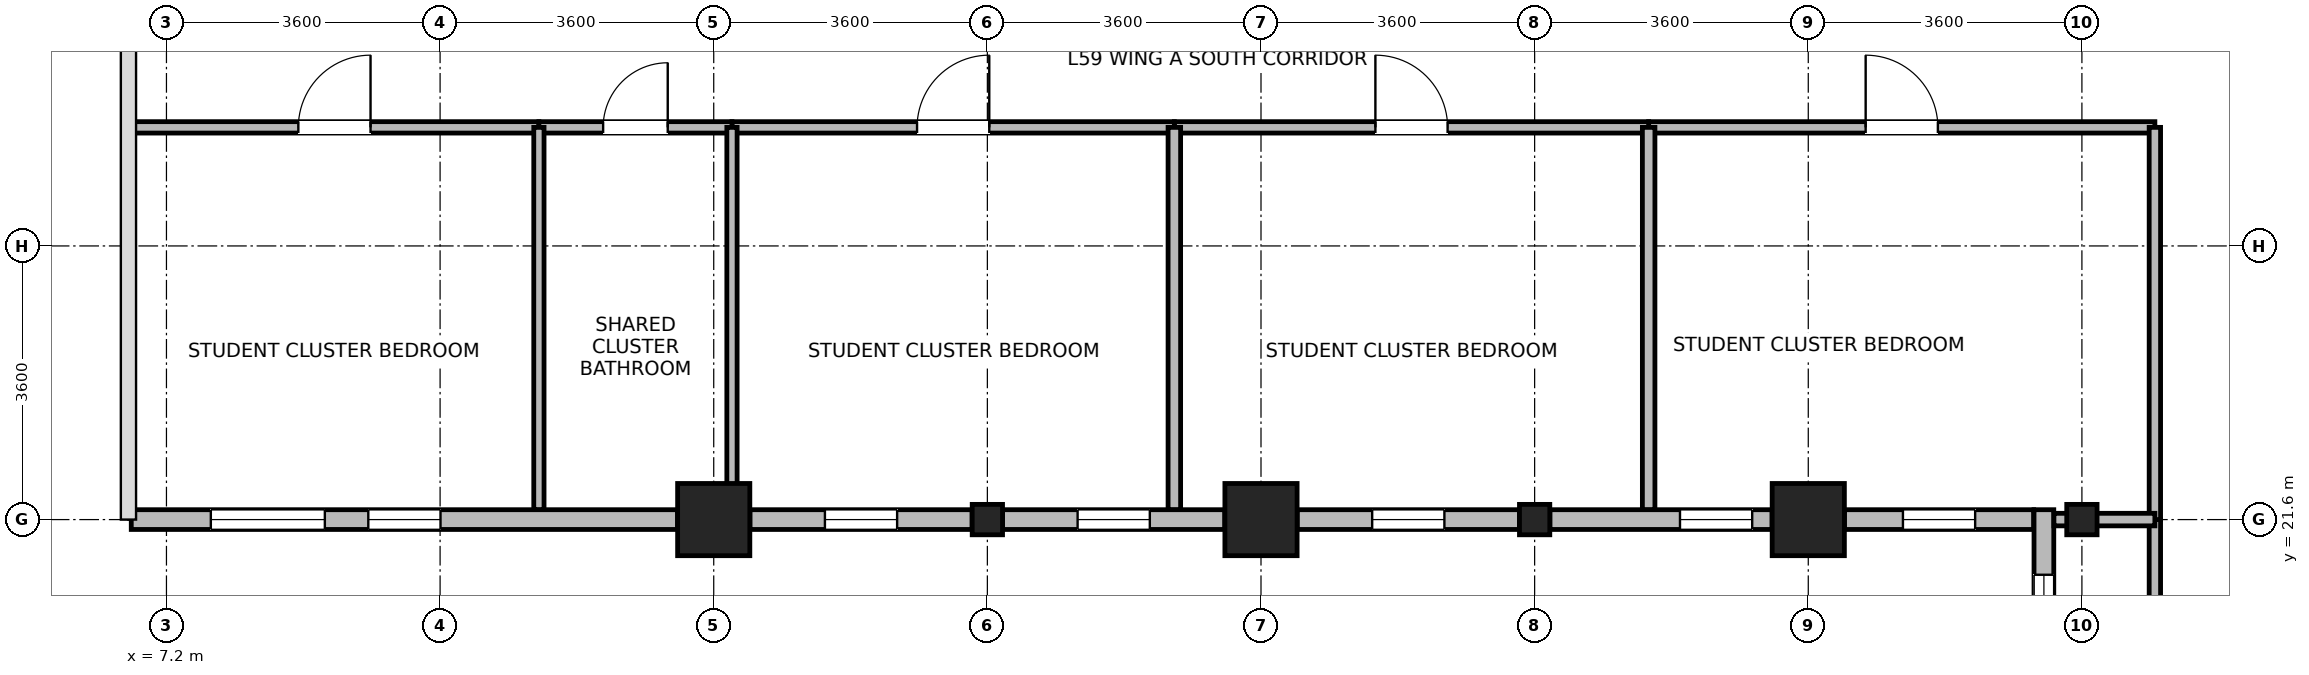
"""IFC4 building model, lengths in metres.
Left out: names, types, materials, properties, quantities, classifications, styles, units other than length and angle.
Written with IfcOpenShell. Run it as: python <this file> out.ifc"""

import sys

from ifc_helpers import new_model, si_unit, direction, frame, frame_2d, origin, origin_2d, place, context, subcontext, project, spatial, rectangle, i_section, extrude, source, transform, mapped, element, fill, save


model = new_model("IFC4")
c1 = context("Model", 3, precision=1e-05, world=origin(), true_north=direction((0.0, 1.0)))
c2 = subcontext(c1, "Body", "Model", "MODEL_VIEW")
j1 = project(units=[si_unit("LENGTHUNIT", "METRE"), si_unit("PLANEANGLEUNIT", "RADIAN")], contexts=[c1])
p1 = place(None, origin())
s1 = spatial("IfcSite", under=j1, at=p1, CompositionType="ELEMENT")
p2 = place(p1, origin())
s2 = spatial("IfcBuilding", under=s1, at=p2, CompositionType="ELEMENT")
p3 = place(p2, frame((0.0, 0.0, 231.4)))
s3 = spatial("IfcBuildingStorey", under=s2, at=p3, CompositionType="ELEMENT", Elevation=231.4)
m1 = source(origin(), c2, "Body", "SweptSolid", [
    extrude(rectangle(XDim=0.95, YDim=0.95, at=origin_2d()), origin(), (0.0, 0.0, 1.0), 3.7),
])
for number, where, z_axis, x_axis in (
    (1, (14.4, 21.6, 0.0), (0.0, 0.0, 1.0), (1.0, 0.0, 0.0)),
    (2, (21.6, 21.6, 0.0), (0.0, 0.0, 1.0), (1.0, 0.0, 0.0)),
    (3, (28.8, 21.6, 0.0), (0.0, 0.0, 1.0), (1.0, 0.0, 0.0)),
):
    element("IfcColumn", number, at=place(p3, frame(where, z_axis=z_axis, x_axis=x_axis)), inside=s3, PredefinedType="COLUMN", context=c2, shape_type="MappedRepresentation", body=[
        mapped(m1, transform((0.0, 0.0, 0.0), x_axis=(1.0, 0.0, 0.0), y_axis=(0.0, 1.0, 0.0), z_axis=(0.0, 0.0, 1.0), scale=1.0)),
    ])
m2 = source(origin(), c2, "Body", "SweptSolid", [
    extrude(i_section(OverallWidth=0.399, OverallDepth=0.4, WebThickness=0.017, FlangeThickness=0.023, FilletRadius=0.015, at=origin_2d()), origin(), (0.0, 0.0, 1.0), 3.7),
])
for number, where, z_axis, x_axis in (
    (4, (18.0, 21.6, 0.0), (0.0, 0.0, 1.0), (1.0, 0.0, 0.0)),
    (5, (25.2, 21.6, 0.0), (0.0, 0.0, 1.0), (1.0, 0.0, 0.0)),
    (6, (32.4, 21.6, 0.0), (0.0, 0.0, 1.0), (1.0, 0.0, 0.0)),
):
    element("IfcColumn", number, at=place(p3, frame(where, z_axis=z_axis, x_axis=x_axis)), inside=s3, PredefinedType="COLUMN", context=c2, shape_type="MappedRepresentation", body=[
        mapped(m2, transform((0.0, 0.0, 0.0), x_axis=(1.0, 0.0, 0.0), y_axis=(0.0, 1.0, 0.0), z_axis=(0.0, 0.0, 1.0), scale=1.0)),
    ])
p4 = place(p3, frame((13.924, 21.6, 0.0), z_axis=(0.0, 0.0, 1.0), x_axis=(-1.0, 0.0, 0.0)))
e7 = element("IfcWall", 7, at=p4, inside=s3, PredefinedType="STANDARD", context=c2, shape_type="SweptSolid", body=[
    extrude(rectangle(XDim=7.187, YDim=0.26, at=frame_2d((3.594, 0.0))), origin(), (0.0, 0.0, 1.0), 3.42),
])
p5 = place(p4, frame((4.64, 0.0, 0.85)))
e8 = element("IfcOpeningElement", 8, at=p5, cuts=e7, PredefinedType="OPENING", context=c2, shape_type="SweptSolid", body=[
    extrude(rectangle(XDim=1.5, YDim=1.85, at=frame_2d((0.75, 0.925))), frame((0.0, 0.14, 0.0), z_axis=(0.0, -1.0, 0.0), x_axis=(1.0, 0.0, 0.0)), (0.0, 0.0, 1.0), 0.28),
])
p6 = place(p4, frame((3.118, 0.0, 0.85)))
e9 = element("IfcOpeningElement", 9, at=p6, cuts=e7, PredefinedType="OPENING", context=c2, shape_type="SweptSolid", body=[
    extrude(rectangle(XDim=0.95, YDim=1.75, at=frame_2d((0.475, 0.875))), frame((0.0, 0.14, 0.0), z_axis=(0.0, -1.0, 0.0), x_axis=(1.0, 0.0, 0.0)), (0.0, 0.0, 1.0), 0.28),
])
p7 = place(p3, frame((17.8, 21.6, 0.0), z_axis=(0.0, 0.0, 1.0), x_axis=(-1.0, 0.0, 0.0)))
e10 = element("IfcWall", 10, at=p7, inside=s3, PredefinedType="STANDARD", context=c2, shape_type="SweptSolid", body=[
    extrude(rectangle(XDim=2.924, YDim=0.26, at=frame_2d((1.462, 0.0))), origin(), (0.0, 0.0, 1.0), 3.02),
])
p8 = place(p7, frame((0.987, 0.0, 0.85)))
e11 = element("IfcOpeningElement", 11, at=p8, cuts=e10, PredefinedType="OPENING", context=c2, shape_type="SweptSolid", body=[
    extrude(rectangle(XDim=0.95, YDim=1.75, at=frame_2d((0.475, 0.875))), frame((0.0, 0.14, 0.0), z_axis=(0.0, -1.0, 0.0), x_axis=(1.0, 0.0, 0.0)), (0.0, 0.0, 1.0), 0.28),
])
p9 = place(p3, frame((21.124, 21.6, 0.0), z_axis=(0.0, 0.0, 1.0), x_axis=(-1.0, 0.0, 0.0)))
e12 = element("IfcWall", 12, at=p9, inside=s3, PredefinedType="STANDARD", context=c2, shape_type="SweptSolid", body=[
    extrude(rectangle(XDim=2.924, YDim=0.26, at=frame_2d((1.462, 0.0))), origin(), (0.0, 0.0, 1.0), 3.02),
])
p10 = place(p9, frame((0.987, 0.0, 0.85)))
e13 = element("IfcOpeningElement", 13, at=p10, cuts=e12, PredefinedType="OPENING", context=c2, shape_type="SweptSolid", body=[
    extrude(rectangle(XDim=0.95, YDim=1.75, at=frame_2d((0.475, 0.875))), frame((0.0, 0.14, 0.0), z_axis=(0.0, -1.0, 0.0), x_axis=(1.0, 0.0, 0.0)), (0.0, 0.0, 1.0), 0.28),
])
p11 = place(p3, frame((25.0, 21.6, 0.0), z_axis=(0.0, 0.0, 1.0), x_axis=(-1.0, 0.0, 0.0)))
e14 = element("IfcWall", 14, at=p11, inside=s3, PredefinedType="STANDARD", context=c2, shape_type="SweptSolid", body=[
    extrude(rectangle(XDim=2.924, YDim=0.26, at=frame_2d((1.462, 0.0))), origin(), (0.0, 0.0, 1.0), 3.02),
])
p12 = place(p11, frame((0.987, 0.0, 0.85)))
e15 = element("IfcOpeningElement", 15, at=p12, cuts=e14, PredefinedType="OPENING", context=c2, shape_type="SweptSolid", body=[
    extrude(rectangle(XDim=0.95, YDim=1.75, at=frame_2d((0.475, 0.875))), frame((0.0, 0.14, 0.0), z_axis=(0.0, -1.0, 0.0), x_axis=(1.0, 0.0, 0.0)), (0.0, 0.0, 1.0), 0.28),
])
p13 = place(p3, frame((28.324, 21.6, 0.0), z_axis=(0.0, 0.0, 1.0), x_axis=(-1.0, 0.0, 0.0)))
e16 = element("IfcWall", 16, at=p13, inside=s3, PredefinedType="STANDARD", context=c2, shape_type="SweptSolid", body=[
    extrude(rectangle(XDim=2.924, YDim=0.26, at=frame_2d((1.462, 0.0))), origin(), (0.0, 0.0, 1.0), 3.02),
])
p14 = place(p13, frame((0.262, 0.0, 0.85)))
e17 = element("IfcOpeningElement", 17, at=p14, cuts=e16, PredefinedType="OPENING", context=c2, shape_type="SweptSolid", body=[
    extrude(rectangle(XDim=0.95, YDim=1.75, at=frame_2d((0.475, 0.875))), frame((0.0, 0.14, 0.0), z_axis=(0.0, -1.0, 0.0), x_axis=(1.0, 0.0, 0.0)), (0.0, 0.0, 1.0), 0.28),
])
p15 = place(p3, frame((31.765, 21.6, 0.0), z_axis=(0.0, 0.0, 1.0), x_axis=(-1.0, 0.0, 0.0)))
e18 = element("IfcWall", 18, at=p15, inside=s3, PredefinedType="STANDARD", context=c2, shape_type="SweptSolid", body=[
    extrude(rectangle(XDim=2.489, YDim=0.26, at=frame_2d((1.245, 0.0))), origin(), (0.0, 0.0, 1.0), 3.02),
])
p16 = place(p15, frame((0.77, 0.0, 0.85)))
e19 = element("IfcOpeningElement", 19, at=p16, cuts=e18, PredefinedType="OPENING", context=c2, shape_type="SweptSolid", body=[
    extrude(rectangle(XDim=0.95, YDim=1.75, at=frame_2d((0.475, 0.875))), frame((0.0, 0.14, 0.0), z_axis=(0.0, -1.0, 0.0), x_axis=(1.0, 0.0, 0.0)), (0.0, 0.0, 1.0), 0.28),
])
p17 = place(p3, frame((31.9, 5.67, 0.0), z_axis=(0.0, 0.0, 1.0), x_axis=(0.0, 1.0, 0.0)))
e20 = element("IfcWall", 20, at=p17, inside=s3, PredefinedType="STANDARD", context=c2, shape_type="SweptSolid", body=[
    extrude(rectangle(XDim=16.06, YDim=0.26, at=frame_2d((8.03, 0.0))), origin(), (0.0, 0.0, 1.0), 3.42),
])
p18 = place(p17, frame((4.068, 0.0, 0.85)))
e21 = element("IfcOpeningElement", 21, at=p18, cuts=e20, PredefinedType="OPENING", context=c2, shape_type="SweptSolid", body=[
    extrude(rectangle(XDim=1.5, YDim=1.85, at=frame_2d((0.75, 0.925))), frame((0.0, 0.14, 0.0), z_axis=(0.0, -1.0, 0.0), x_axis=(1.0, 0.0, 0.0)), (0.0, 0.0, 1.0), 0.28),
])
p19 = place(p17, frame((10.492, 0.0, 0.85)))
e22 = element("IfcOpeningElement", 22, at=p19, cuts=e20, PredefinedType="OPENING", context=c2, shape_type="SweptSolid", body=[
    extrude(rectangle(XDim=1.5, YDim=1.85, at=frame_2d((0.75, 0.925))), frame((0.0, 0.14, 0.0), z_axis=(0.0, -1.0, 0.0), x_axis=(1.0, 0.0, 0.0)), (0.0, 0.0, 1.0), 0.28),
])
p20 = place(p17, frame((13.704, 0.0, 0.85)))
e23 = element("IfcOpeningElement", 23, at=p20, cuts=e20, PredefinedType="OPENING", context=c2, shape_type="SweptSolid", body=[
    extrude(rectangle(XDim=1.5, YDim=1.85, at=frame_2d((0.75, 0.925))), frame((0.0, 0.14, 0.0), z_axis=(0.0, -1.0, 0.0), x_axis=(1.0, 0.0, 0.0)), (0.0, 0.0, 1.0), 0.28),
])
p21 = place(p3, frame((33.36, 14.5, 0.0), z_axis=(0.0, 0.0, 1.0), x_axis=(0.0, 1.0, 0.0)))
e24 = element("IfcWall", 24, at=p21, inside=s3, PredefinedType="PARTITIONING", context=c2, shape_type="SweptSolid", body=[
    extrude(rectangle(XDim=7.1, YDim=0.15, at=frame_2d((3.55, 0.0))), origin(), (0.0, 0.0, 1.0), 3.42),
])
p22 = place(p21, frame((2.9, 0.0, 0.0)))
e25 = element("IfcOpeningElement", 25, at=p22, cuts=e24, PredefinedType="OPENING", context=c2, shape_type="SweptSolid", body=[
    extrude(rectangle(XDim=1.3, YDim=2.12, at=frame_2d((0.65, 1.06))), frame((0.0, 0.085, 0.0), z_axis=(0.0, -1.0, 0.0), x_axis=(1.0, 0.0, 0.0)), (0.0, 0.0, 1.0), 0.17),
])
p23 = place(p3, frame((26.7, 26.76, 0.0), z_axis=(0.0, 0.0, 1.0), x_axis=(1.0, 0.0, 0.0)))
e26 = element("IfcWall", 26, at=p23, inside=s3, PredefinedType="PARTITIONING", context=c2, shape_type="SweptSolid", body=[
    extrude(rectangle(XDim=6.66, YDim=0.15, at=frame_2d((3.33, 0.0))), origin(), (0.0, 0.0, 1.0), 3.42),
])
p24 = place(p23, frame((2.855, 0.0, 0.0)))
e27 = element("IfcOpeningElement", 27, at=p24, cuts=e26, PredefinedType="OPENING", context=c2, shape_type="SweptSolid", body=[
    extrude(rectangle(XDim=0.95, YDim=2.1, at=frame_2d((0.475, 1.05))), frame((0.0, 0.085, 0.0), z_axis=(0.0, -1.0, 0.0), x_axis=(1.0, 0.0, 0.0)), (0.0, 0.0, 1.0), 0.17),
])
p25 = place(p3, frame((20.46, 26.76, 0.0), z_axis=(0.0, 0.0, 1.0), x_axis=(1.0, 0.0, 0.0)))
e28 = element("IfcWall", 28, at=p25, inside=s3, PredefinedType="PARTITIONING", context=c2, shape_type="SweptSolid", body=[
    extrude(rectangle(XDim=6.24, YDim=0.15, at=frame_2d((3.12, 0.0))), origin(), (0.0, 0.0, 1.0), 3.42),
])
p26 = place(p25, frame((2.645, 0.0, 0.0)))
e29 = element("IfcOpeningElement", 29, at=p26, cuts=e28, PredefinedType="OPENING", context=c2, shape_type="SweptSolid", body=[
    extrude(rectangle(XDim=0.95, YDim=2.1, at=frame_2d((0.475, 1.05))), frame((0.0, 0.085, 0.0), z_axis=(0.0, -1.0, 0.0), x_axis=(1.0, 0.0, 0.0)), (0.0, 0.0, 1.0), 0.17),
])
p27 = place(p3, frame((14.64, 26.76, 0.0), z_axis=(0.0, 0.0, 1.0), x_axis=(1.0, 0.0, 0.0)))
e30 = element("IfcWall", 30, at=p27, inside=s3, PredefinedType="PARTITIONING", context=c2, shape_type="SweptSolid", body=[
    extrude(rectangle(XDim=5.82, YDim=0.15, at=frame_2d((2.91, 0.0))), origin(), (0.0, 0.0, 1.0), 3.42),
])
p28 = place(p27, frame((2.435, 0.0, 0.0)))
e31 = element("IfcOpeningElement", 31, at=p28, cuts=e30, PredefinedType="OPENING", context=c2, shape_type="SweptSolid", body=[
    extrude(rectangle(XDim=0.95, YDim=2.1, at=frame_2d((0.475, 1.05))), frame((0.0, 0.085, 0.0), z_axis=(0.0, -1.0, 0.0), x_axis=(1.0, 0.0, 0.0)), (0.0, 0.0, 1.0), 0.17),
])
p29 = place(p3, frame((6.72, 26.76, 0.0), z_axis=(0.0, 0.0, 1.0), x_axis=(1.0, 0.0, 0.0)))
e32 = element("IfcWall", 32, at=p29, inside=s3, PredefinedType="PARTITIONING", context=c2, shape_type="SweptSolid", body=[
    extrude(rectangle(XDim=5.38, YDim=0.15, at=frame_2d((2.69, 0.0))), origin(), (0.0, 0.0, 1.0), 3.42),
])
p30 = place(p29, frame((2.215, 0.0, 0.0)))
e33 = element("IfcOpeningElement", 33, at=p30, cuts=e32, PredefinedType="OPENING", context=c2, shape_type="SweptSolid", body=[
    extrude(rectangle(XDim=0.95, YDim=2.1, at=frame_2d((0.475, 1.05))), frame((0.0, 0.085, 0.0), z_axis=(0.0, -1.0, 0.0), x_axis=(1.0, 0.0, 0.0)), (0.0, 0.0, 1.0), 0.17),
])
p31 = place(p3, frame((33.36, 21.6, 0.0), z_axis=(0.0, 0.0, 1.0), x_axis=(0.0, 1.0, 0.0)))
e34 = element("IfcWall", 34, at=p31, inside=s3, PredefinedType="PARTITIONING", context=c2, shape_type="SweptSolid", body=[
    extrude(rectangle(XDim=5.16, YDim=0.15, at=frame_2d((2.58, 0.0))), origin(), (0.0, 0.0, 1.0), 3.42),
])
p32 = place(p3, frame((12.1, 26.76, 0.0), z_axis=(0.0, 0.0, 1.0), x_axis=(1.0, 0.0, 0.0)))
e35 = element("IfcWall", 35, at=p32, inside=s3, PredefinedType="PARTITIONING", context=c2, shape_type="SweptSolid", body=[
    extrude(rectangle(XDim=2.54, YDim=0.15, at=frame_2d((1.27, 0.0))), origin(), (0.0, 0.0, 1.0), 3.42),
])
p33 = place(p32, frame((0.845, 0.0, 0.0)))
e36 = element("IfcOpeningElement", 36, at=p33, cuts=e35, PredefinedType="OPENING", context=c2, shape_type="SweptSolid", body=[
    extrude(rectangle(XDim=0.85, YDim=2.04, at=frame_2d((0.425, 1.02))), frame((0.0, 0.085, 0.0), z_axis=(0.0, -1.0, 0.0), x_axis=(1.0, 0.0, 0.0)), (0.0, 0.0, 1.0), 0.17),
])
for number, where, z_axis, x_axis in (
    (37, (12.1, 21.732, 0.0), (0.0, 0.0, 1.0), (0.0, 1.0, 0.0)),
    (38, (14.64, 21.732, 0.0), (0.0, 0.0, 1.0), (0.0, 1.0, 0.0)),
):
    element("IfcWall", number, at=place(p3, frame(where, z_axis=z_axis, x_axis=x_axis)), inside=s3, PredefinedType="PARTITIONING", context=c2, shape_type="SweptSolid", body=[
        extrude(rectangle(XDim=5.028, YDim=0.135, at=frame_2d((2.514, 0.0))), origin(), (0.0, 0.0, 1.0), 3.42),
    ])
for number, where, z_axis, x_axis in (
    (39, (20.46, 21.732, 0.0), (0.0, 0.0, 1.0), (0.0, 1.0, 0.0)),
    (40, (26.7, 21.732, 0.0), (0.0, 0.0, 1.0), (0.0, 1.0, 0.0)),
):
    element("IfcWall", number, at=place(p3, frame(where, z_axis=z_axis, x_axis=x_axis)), inside=s3, PredefinedType="PARTITIONING", context=c2, shape_type="SweptSolid", body=[
        extrude(rectangle(XDim=5.028, YDim=0.165, at=frame_2d((2.514, 0.0))), origin(), (0.0, 0.0, 1.0), 3.42),
    ])
p34 = place(p3, frame((32.032, 21.6, 0.0), z_axis=(0.0, 0.0, 1.0), x_axis=(1.0, 0.0, 0.0)))
e41 = element("IfcWall", 41, at=p34, inside=s3, PredefinedType="PARTITIONING", context=c2, shape_type="SweptSolid", body=[
    extrude(rectangle(XDim=1.328, YDim=0.165, at=frame_2d((0.664, 0.0))), origin(), (0.0, 0.0, 1.0), 3.02),
])
p35 = place(p5, origin())
e42 = element("IfcWindow", 42, at=p35, inside=s3, PartitioningType="SINGLE_PANEL", PredefinedType="WINDOW", context=c2, shape_type="SweptSolid", body=[
    extrude(rectangle(XDim=1.5, YDim=1.85, at=frame_2d((0.75, 0.925))), frame((0.0, 0.03, 0.0), z_axis=(0.0, -1.0, 0.0), x_axis=(1.0, 0.0, 0.0)), (0.0, 0.0, 1.0), 0.06),
])
fill(e8, e42)
p36 = place(p6, origin())
e43 = element("IfcWindow", 43, at=p36, inside=s3, PartitioningType="SINGLE_PANEL", PredefinedType="WINDOW", context=c2, shape_type="SweptSolid", body=[
    extrude(rectangle(XDim=0.95, YDim=1.75, at=frame_2d((0.475, 0.875))), frame((0.0, 0.03, 0.0), z_axis=(0.0, -1.0, 0.0), x_axis=(1.0, 0.0, 0.0)), (0.0, 0.0, 1.0), 0.06),
])
fill(e9, e43)
p37 = place(p8, origin())
e44 = element("IfcWindow", 44, at=p37, inside=s3, PartitioningType="SINGLE_PANEL", PredefinedType="WINDOW", context=c2, shape_type="SweptSolid", body=[
    extrude(rectangle(XDim=0.95, YDim=1.75, at=frame_2d((0.475, 0.875))), frame((0.0, 0.03, 0.0), z_axis=(0.0, -1.0, 0.0), x_axis=(1.0, 0.0, 0.0)), (0.0, 0.0, 1.0), 0.06),
])
fill(e11, e44)
p38 = place(p10, origin())
e45 = element("IfcWindow", 45, at=p38, inside=s3, PartitioningType="SINGLE_PANEL", PredefinedType="WINDOW", context=c2, shape_type="SweptSolid", body=[
    extrude(rectangle(XDim=0.95, YDim=1.75, at=frame_2d((0.475, 0.875))), frame((0.0, 0.03, 0.0), z_axis=(0.0, -1.0, 0.0), x_axis=(1.0, 0.0, 0.0)), (0.0, 0.0, 1.0), 0.06),
])
fill(e13, e45)
p39 = place(p12, origin())
e46 = element("IfcWindow", 46, at=p39, inside=s3, PartitioningType="SINGLE_PANEL", PredefinedType="WINDOW", context=c2, shape_type="SweptSolid", body=[
    extrude(rectangle(XDim=0.95, YDim=1.75, at=frame_2d((0.475, 0.875))), frame((0.0, 0.03, 0.0), z_axis=(0.0, -1.0, 0.0), x_axis=(1.0, 0.0, 0.0)), (0.0, 0.0, 1.0), 0.06),
])
fill(e15, e46)
p40 = place(p14, origin())
e47 = element("IfcWindow", 47, at=p40, inside=s3, PartitioningType="SINGLE_PANEL", PredefinedType="WINDOW", context=c2, shape_type="SweptSolid", body=[
    extrude(rectangle(XDim=0.95, YDim=1.75, at=frame_2d((0.475, 0.875))), frame((0.0, 0.03, 0.0), z_axis=(0.0, -1.0, 0.0), x_axis=(1.0, 0.0, 0.0)), (0.0, 0.0, 1.0), 0.06),
])
fill(e17, e47)
p41 = place(p16, origin())
e48 = element("IfcWindow", 48, at=p41, inside=s3, PartitioningType="SINGLE_PANEL", PredefinedType="WINDOW", context=c2, shape_type="SweptSolid", body=[
    extrude(rectangle(XDim=0.95, YDim=1.75, at=frame_2d((0.475, 0.875))), frame((0.0, 0.03, 0.0), z_axis=(0.0, -1.0, 0.0), x_axis=(1.0, 0.0, 0.0)), (0.0, 0.0, 1.0), 0.06),
])
fill(e19, e48)
p42 = place(p20, origin())
e49 = element("IfcWindow", 49, at=p42, inside=s3, PartitioningType="SINGLE_PANEL", PredefinedType="WINDOW", context=c2, shape_type="SweptSolid", body=[
    extrude(rectangle(XDim=1.5, YDim=1.85, at=frame_2d((0.75, 0.925))), frame((0.0, 0.03, 0.0), z_axis=(0.0, -1.0, 0.0), x_axis=(1.0, 0.0, 0.0)), (0.0, 0.0, 1.0), 0.06),
])
fill(e23, e49)
p43 = place(p24, origin())
e50 = element("IfcDoor", 50, at=p43, inside=s3, OperationType="SINGLE_SWING_LEFT", PredefinedType="DOOR", context=c2, shape_type="SweptSolid", body=[
    extrude(rectangle(XDim=0.95, YDim=2.1, at=frame_2d((0.475, 1.05))), frame((0.0, 0.025, 0.0), z_axis=(0.0, -1.0, 0.0), x_axis=(1.0, 0.0, 0.0)), (0.0, 0.0, 1.0), 0.05),
])
fill(e27, e50)
p44 = place(p26, origin())
e51 = element("IfcDoor", 51, at=p44, inside=s3, OperationType="SINGLE_SWING_LEFT", PredefinedType="DOOR", context=c2, shape_type="SweptSolid", body=[
    extrude(rectangle(XDim=0.95, YDim=2.1, at=frame_2d((0.475, 1.05))), frame((0.0, 0.025, 0.0), z_axis=(0.0, -1.0, 0.0), x_axis=(1.0, 0.0, 0.0)), (0.0, 0.0, 1.0), 0.05),
])
fill(e29, e51)
p45 = place(p28, origin())
e52 = element("IfcDoor", 52, at=p45, inside=s3, OperationType="SINGLE_SWING_RIGHT", PredefinedType="DOOR", context=c2, shape_type="SweptSolid", body=[
    extrude(rectangle(XDim=0.95, YDim=2.1, at=frame_2d((0.475, 1.05))), frame((0.0, 0.025, 0.0), z_axis=(0.0, -1.0, 0.0), x_axis=(1.0, 0.0, 0.0)), (0.0, 0.0, 1.0), 0.05),
])
fill(e31, e52)
p46 = place(p30, origin())
e53 = element("IfcDoor", 53, at=p46, inside=s3, OperationType="SINGLE_SWING_RIGHT", PredefinedType="DOOR", context=c2, shape_type="SweptSolid", body=[
    extrude(rectangle(XDim=0.95, YDim=2.1, at=frame_2d((0.475, 1.05))), frame((0.0, 0.025, 0.0), z_axis=(0.0, -1.0, 0.0), x_axis=(1.0, 0.0, 0.0)), (0.0, 0.0, 1.0), 0.05),
])
fill(e33, e53)
p47 = place(p33, origin())
e54 = element("IfcDoor", 54, at=p47, inside=s3, OperationType="SINGLE_SWING_RIGHT", PredefinedType="DOOR", context=c2, shape_type="SweptSolid", body=[
    extrude(rectangle(XDim=0.85, YDim=2.04, at=frame_2d((0.425, 1.02))), frame((0.0, 0.025, 0.0), z_axis=(0.0, -1.0, 0.0), x_axis=(1.0, 0.0, 0.0)), (0.0, 0.0, 1.0), 0.05),
])
fill(e36, e54)
save(model, sys.argv[1])
